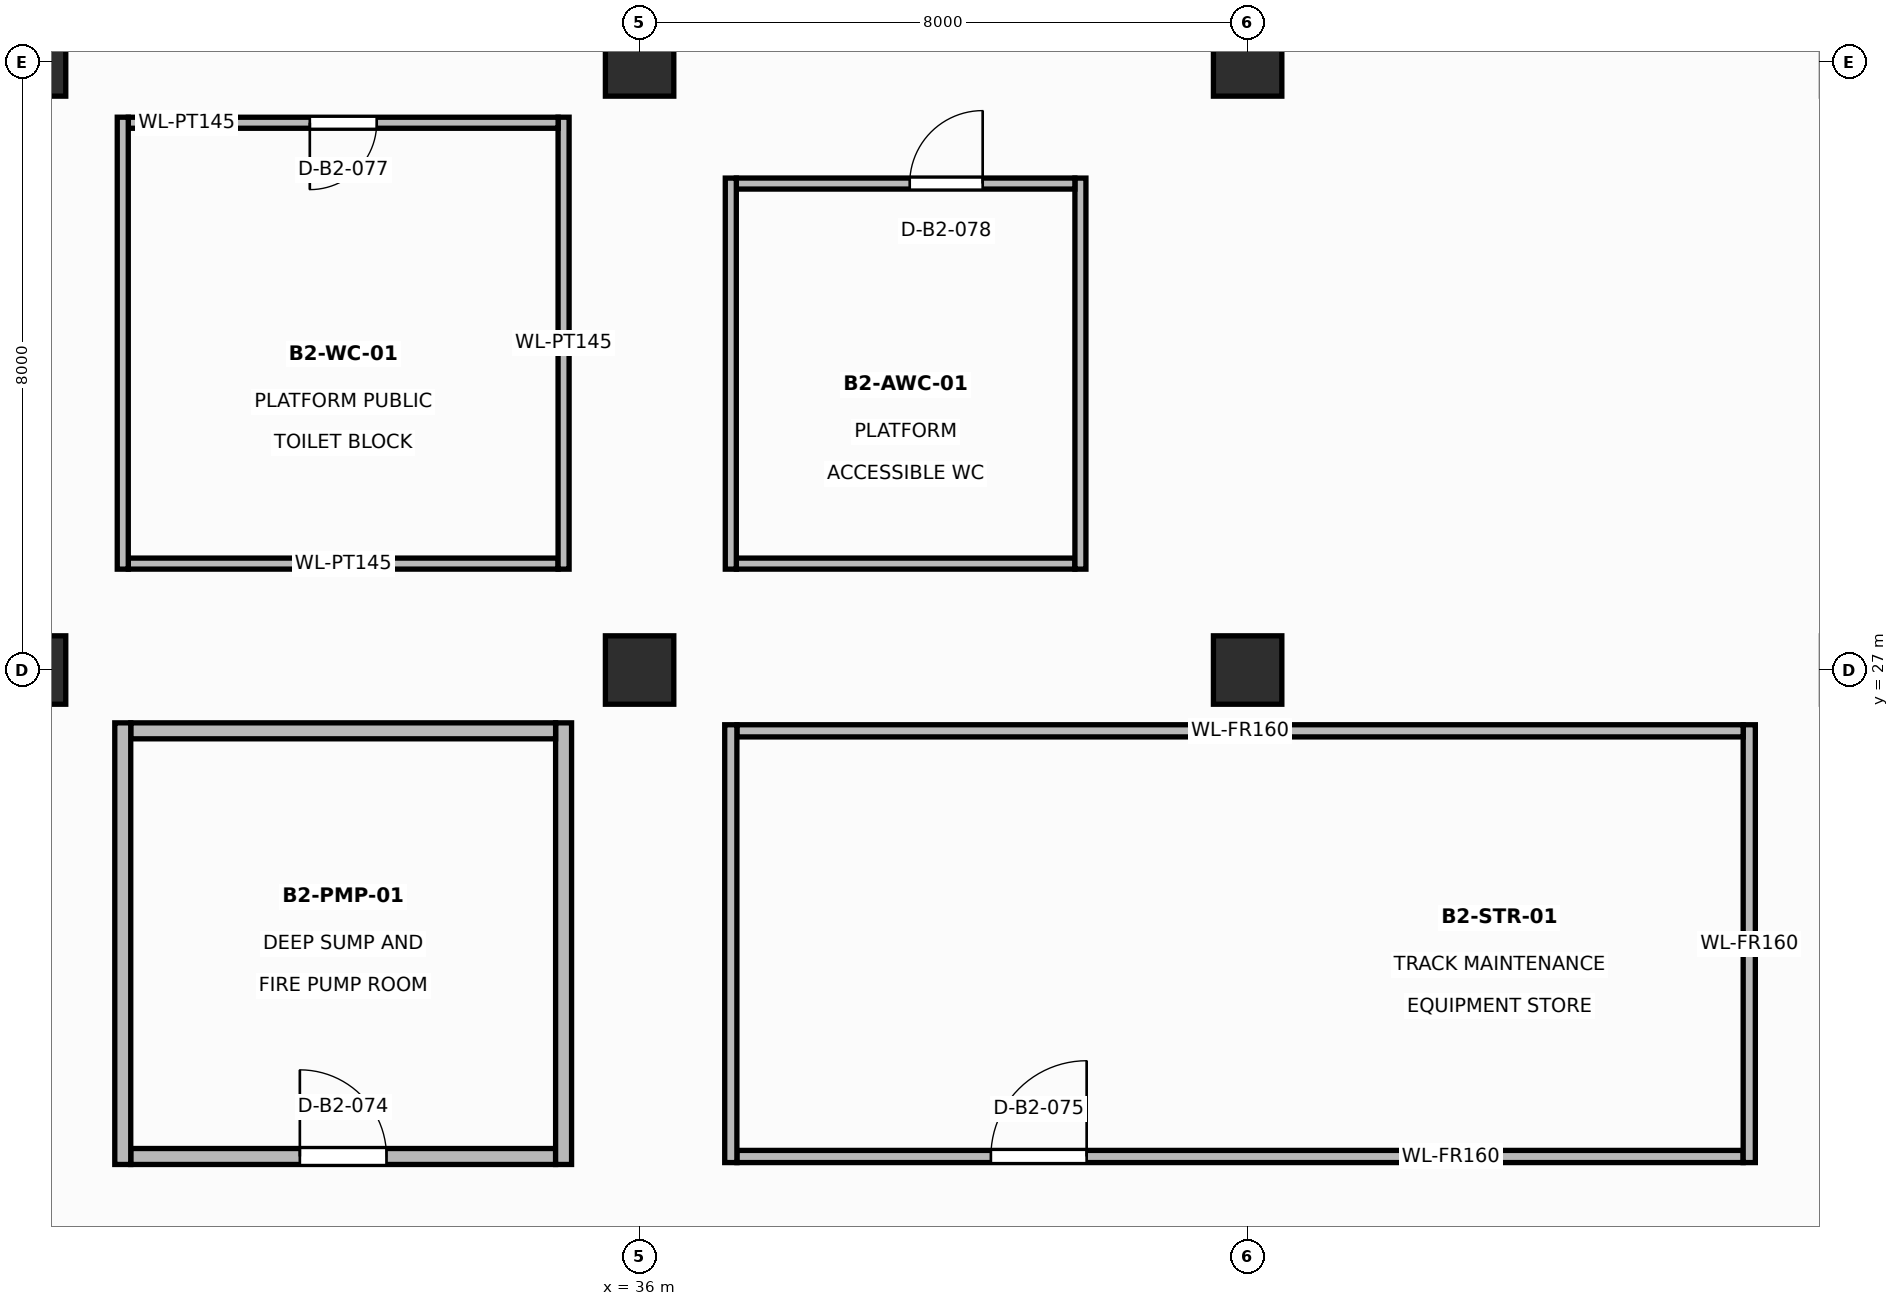
"""IFC4 building model, lengths in metres.
Left out: names, types, materials, properties, quantities, classifications, styles, units other than length and angle.
Written with IfcOpenShell. Run it as: python <this file> out.ifc"""

import sys

from ifc_helpers import new_model, si_unit, direction, frame, frame_2d, origin, origin_2d, place, context, subcontext, project, spatial, rectangle, extrude, element, fill, save


model = new_model("IFC4")
c1 = context("Model", 3, precision=1e-05, world=origin(), true_north=direction((0.0, 1.0)))
c2 = subcontext(c1, "Body", "Model", "MODEL_VIEW")
j1 = project(units=[si_unit("LENGTHUNIT", "METRE"), si_unit("PLANEANGLEUNIT", "RADIAN")], contexts=[c1])
p1 = place(None, origin())
s1 = spatial("IfcSite", under=j1, at=p1, CompositionType="ELEMENT")
p2 = place(p1, origin())
s2 = spatial("IfcBuilding", under=s1, at=p2, CompositionType="ELEMENT")
p3 = place(p2, frame((0.0, 0.0, -11.2)))
s3 = spatial("IfcBuildingStorey", under=s2, at=p3, CompositionType="ELEMENT", Elevation=-11.2)
for number, where, z_axis, x_axis in (
    (1, (28.0, 27.0, 0.0), (0.0, 0.0, 1.0), (1.0, 0.0, 0.0)),
    (2, (28.0, 35.0, 0.0), (0.0, 0.0, 1.0), (1.0, 0.0, 0.0)),
    (3, (36.0, 27.0, 0.0), (0.0, 0.0, 1.0), (1.0, 0.0, 0.0)),
    (4, (36.0, 35.0, 0.0), (0.0, 0.0, 1.0), (1.0, 0.0, 0.0)),
    (5, (44.0, 27.0, 0.0), (0.0, 0.0, 1.0), (1.0, 0.0, 0.0)),
    (6, (44.0, 35.0, 0.0), (0.0, 0.0, 1.0), (1.0, 0.0, 0.0)),
):
    element("IfcColumn", number, at=place(p3, frame(where, z_axis=z_axis, x_axis=x_axis)), inside=s3, PredefinedType="COLUMN", context=c2, shape_type="SweptSolid", body=[
        extrude(rectangle(XDim=0.9, YDim=0.9, at=origin_2d()), origin(), (0.0, 0.0, 1.0), 5.6),
    ])
p4 = place(p3, frame((29.305, 20.6, 0.0), z_axis=(0.0, 0.0, 1.0), x_axis=(1.0, 0.0, 0.0)))
e7 = element("IfcWall", 7, at=p4, inside=s3, PredefinedType="SOLIDWALL", context=c2, shape_type="SweptSolid", body=[
    extrude(rectangle(XDim=5.59, YDim=0.21, at=frame_2d((2.795, 0.0))), origin(), (0.0, 0.0, 1.0), 5.22),
])
p5 = place(p4, frame((2.225, 0.0, 0.0)))
e8 = element("IfcOpeningElement", 8, at=p5, cuts=e7, PredefinedType="OPENING", context=c2, shape_type="SweptSolid", body=[
    extrude(rectangle(XDim=1.14, YDim=2.18, at=frame_2d((0.57, 1.09))), frame((0.0, 0.115, 0.0), z_axis=(0.0, -1.0, 0.0), x_axis=(1.0, 0.0, 0.0)), (0.0, 0.0, 1.0), 0.23),
])
p6 = place(p3, frame((35.0, 20.495, 0.0), z_axis=(0.0, 0.0, 1.0), x_axis=(0.0, 1.0, 0.0)))
e9 = element("IfcWall", 9, at=p6, inside=s3, PredefinedType="SOLIDWALL", context=c2, shape_type="SweptSolid", body=[
    extrude(rectangle(XDim=5.81, YDim=0.21, at=frame_2d((2.905, 0.0))), origin(), (0.0, 0.0, 1.0), 4.585),
])
p7 = place(p3, frame((34.895, 26.2, 0.0), z_axis=(0.0, 0.0, 1.0), x_axis=(-1.0, 0.0, 0.0)))
e10 = element("IfcWall", 10, at=p7, inside=s3, PredefinedType="SOLIDWALL", context=c2, shape_type="SweptSolid", body=[
    extrude(rectangle(XDim=5.59, YDim=0.21, at=frame_2d((2.795, 0.0))), origin(), (0.0, 0.0, 1.0), 5.22),
])
p8 = place(p3, frame((29.2, 26.305, 0.0), z_axis=(0.0, 0.0, 1.0), x_axis=(0.0, -1.0, 0.0)))
e11 = element("IfcWall", 11, at=p8, inside=s3, PredefinedType="SOLIDWALL", context=c2, shape_type="SweptSolid", body=[
    extrude(rectangle(XDim=5.81, YDim=0.21, at=frame_2d((2.905, 0.0))), origin(), (0.0, 0.0, 1.0), 4.585),
])
p9 = place(p3, frame((37.28, 20.6, 0.0), z_axis=(0.0, 0.0, 1.0), x_axis=(1.0, 0.0, 0.0)))
e12 = element("IfcWall", 12, at=p9, inside=s3, PredefinedType="PARTITIONING", context=c2, shape_type="SweptSolid", body=[
    extrude(rectangle(XDim=13.24, YDim=0.16, at=frame_2d((6.62, 0.0))), origin(), (0.0, 0.0, 1.0), 4.435),
])
p10 = place(p9, frame((3.342, 0.0, 0.0)))
e13 = element("IfcOpeningElement", 13, at=p10, cuts=e12, PredefinedType="OPENING", context=c2, shape_type="SweptSolid", body=[
    extrude(rectangle(XDim=1.26, YDim=2.2, at=frame_2d((0.63, 1.1))), frame((0.0, 0.09, 0.0), z_axis=(0.0, -1.0, 0.0), x_axis=(1.0, 0.0, 0.0)), (0.0, 0.0, 1.0), 0.18),
])
p11 = place(p3, frame((50.6, 20.52, 0.0), z_axis=(0.0, 0.0, 1.0), x_axis=(0.0, 1.0, 0.0)))
e14 = element("IfcWall", 14, at=p11, inside=s3, PredefinedType="PARTITIONING", context=c2, shape_type="SweptSolid", body=[
    extrude(rectangle(XDim=5.76, YDim=0.16, at=frame_2d((2.88, 0.0))), origin(), (0.0, 0.0, 1.0), 4.585),
])
p12 = place(p3, frame((50.52, 26.2, 0.0), z_axis=(0.0, 0.0, 1.0), x_axis=(-1.0, 0.0, 0.0)))
e15 = element("IfcWall", 15, at=p12, inside=s3, PredefinedType="PARTITIONING", context=c2, shape_type="SweptSolid", body=[
    extrude(rectangle(XDim=13.24, YDim=0.16, at=frame_2d((6.62, 0.0))), origin(), (0.0, 0.0, 1.0), 4.435),
])
p13 = place(p3, frame((37.2, 26.28, 0.0), z_axis=(0.0, 0.0, 1.0), x_axis=(0.0, -1.0, 0.0)))
e16 = element("IfcWall", 16, at=p13, inside=s3, PredefinedType="PARTITIONING", context=c2, shape_type="SweptSolid", body=[
    extrude(rectangle(XDim=5.76, YDim=0.16, at=frame_2d((2.88, 0.0))), origin(), (0.0, 0.0, 1.0), 4.585),
])
p14 = place(p3, frame((29.273, 28.4, 0.0), z_axis=(0.0, 0.0, 1.0), x_axis=(1.0, 0.0, 0.0)))
e17 = element("IfcWall", 17, at=p14, inside=s3, PredefinedType="PARTITIONING", context=c2, shape_type="SweptSolid", body=[
    extrude(rectangle(XDim=5.655, YDim=0.145, at=frame_2d((2.828, 0.0))), origin(), (0.0, 0.0, 1.0), 5.22),
])
p15 = place(p3, frame((35.0, 28.327, 0.0), z_axis=(0.0, 0.0, 1.0), x_axis=(0.0, 1.0, 0.0)))
e18 = element("IfcWall", 18, at=p15, inside=s3, PredefinedType="PARTITIONING", context=c2, shape_type="SweptSolid", body=[
    extrude(rectangle(XDim=5.946, YDim=0.145, at=frame_2d((2.973, 0.0))), origin(), (0.0, 0.0, 1.0), 4.585),
])
p16 = place(p3, frame((34.928, 34.2, 0.0), z_axis=(0.0, 0.0, 1.0), x_axis=(-1.0, 0.0, 0.0)))
e19 = element("IfcWall", 19, at=p16, inside=s3, PredefinedType="PARTITIONING", context=c2, shape_type="SweptSolid", body=[
    extrude(rectangle(XDim=5.655, YDim=0.145, at=frame_2d((2.828, 0.0))), origin(), (0.0, 0.0, 1.0), 5.22),
])
p17 = place(p16, frame((2.387, 0.0, 0.0)))
e20 = element("IfcOpeningElement", 20, at=p17, cuts=e19, PredefinedType="OPENING", context=c2, shape_type="SweptSolid", body=[
    extrude(rectangle(XDim=0.88, YDim=2.08, at=frame_2d((0.44, 1.04))), frame((0.0, 0.083, 0.0), z_axis=(0.0, -1.0, 0.0), x_axis=(1.0, 0.0, 0.0)), (0.0, 0.0, 1.0), 0.165),
])
p18 = place(p3, frame((29.2, 34.273, 0.0), z_axis=(0.0, 0.0, 1.0), x_axis=(0.0, -1.0, 0.0)))
e21 = element("IfcWall", 21, at=p18, inside=s3, PredefinedType="PARTITIONING", context=c2, shape_type="SweptSolid", body=[
    extrude(rectangle(XDim=5.946, YDim=0.145, at=frame_2d((2.973, 0.0))), origin(), (0.0, 0.0, 1.0), 4.585),
])
p19 = place(p3, frame((37.273, 28.4, 0.0), z_axis=(0.0, 0.0, 1.0), x_axis=(1.0, 0.0, 0.0)))
e22 = element("IfcWall", 22, at=p19, inside=s3, PredefinedType="PARTITIONING", context=c2, shape_type="SweptSolid", body=[
    extrude(rectangle(XDim=4.454, YDim=0.145, at=frame_2d((2.227, 0.0))), origin(), (0.0, 0.0, 1.0), 5.22),
])
p20 = place(p3, frame((41.8, 28.327, 0.0), z_axis=(0.0, 0.0, 1.0), x_axis=(0.0, 1.0, 0.0)))
e23 = element("IfcWall", 23, at=p20, inside=s3, PredefinedType="PARTITIONING", context=c2, shape_type="SweptSolid", body=[
    extrude(rectangle(XDim=5.145, YDim=0.145, at=frame_2d((2.573, 0.0))), origin(), (0.0, 0.0, 1.0), 4.585),
])
p21 = place(p3, frame((41.727, 33.4, 0.0), z_axis=(0.0, 0.0, 1.0), x_axis=(-1.0, 0.0, 0.0)))
e24 = element("IfcWall", 24, at=p21, inside=s3, PredefinedType="PARTITIONING", context=c2, shape_type="SweptSolid", body=[
    extrude(rectangle(XDim=4.454, YDim=0.145, at=frame_2d((2.227, 0.0))), origin(), (0.0, 0.0, 1.0), 5.22),
])
p22 = place(p21, frame((1.213, 0.0, 0.0)))
e25 = element("IfcOpeningElement", 25, at=p22, cuts=e24, PredefinedType="OPENING", context=c2, shape_type="SweptSolid", body=[
    extrude(rectangle(XDim=0.96, YDim=2.12, at=frame_2d((0.48, 1.06))), frame((0.0, 0.083, 0.0), z_axis=(0.0, -1.0, 0.0), x_axis=(1.0, 0.0, 0.0)), (0.0, 0.0, 1.0), 0.165),
])
p23 = place(p3, frame((37.2, 33.472, 0.0), z_axis=(0.0, 0.0, 1.0), x_axis=(0.0, -1.0, 0.0)))
e26 = element("IfcWall", 26, at=p23, inside=s3, PredefinedType="PARTITIONING", context=c2, shape_type="SweptSolid", body=[
    extrude(rectangle(XDim=5.145, YDim=0.145, at=frame_2d((2.573, 0.0))), origin(), (0.0, 0.0, 1.0), 4.585),
])
p24 = place(p5, origin())
e27 = element("IfcDoor", 27, at=p24, inside=s3, OperationType="SINGLE_SWING_LEFT", PredefinedType="DOOR", context=c2, shape_type="SweptSolid", body=[
    extrude(rectangle(XDim=1.14, YDim=2.18, at=frame_2d((0.57, 1.09))), frame((0.0, 0.025, 0.0), z_axis=(0.0, -1.0, 0.0), x_axis=(1.0, 0.0, 0.0)), (0.0, 0.0, 1.0), 0.05),
])
fill(e8, e27)
p25 = place(p10, origin())
e28 = element("IfcDoor", 28, at=p25, inside=s3, OperationType="SINGLE_SWING_RIGHT", PredefinedType="DOOR", context=c2, shape_type="SweptSolid", body=[
    extrude(rectangle(XDim=1.26, YDim=2.2, at=frame_2d((0.63, 1.1))), frame((0.0, 0.025, 0.0), z_axis=(0.0, -1.0, 0.0), x_axis=(1.0, 0.0, 0.0)), (0.0, 0.0, 1.0), 0.05),
])
fill(e13, e28)
p26 = place(p17, origin())
e29 = element("IfcDoor", 29, at=p26, inside=s3, OperationType="SINGLE_SWING_RIGHT", PredefinedType="DOOR", context=c2, shape_type="SweptSolid", body=[
    extrude(rectangle(XDim=0.88, YDim=2.08, at=frame_2d((0.44, 1.04))), frame((0.0, 0.025, 0.0), z_axis=(0.0, -1.0, 0.0), x_axis=(1.0, 0.0, 0.0)), (0.0, 0.0, 1.0), 0.05),
])
fill(e20, e29)
p27 = place(p22, frame((0.96, 0.0, 0.0), z_axis=(0.0, 0.0, 1.0), x_axis=(-1.0, 0.0, 0.0)))
e30 = element("IfcDoor", 30, at=p27, inside=s3, OperationType="SINGLE_SWING_LEFT", PredefinedType="DOOR", context=c2, shape_type="SweptSolid", body=[
    extrude(rectangle(XDim=0.96, YDim=2.12, at=frame_2d((0.48, 1.06))), frame((0.0, 0.025, 0.0), z_axis=(0.0, -1.0, 0.0), x_axis=(1.0, 0.0, 0.0)), (0.0, 0.0, 1.0), 0.05),
])
fill(e25, e30)
save(model, sys.argv[1])
